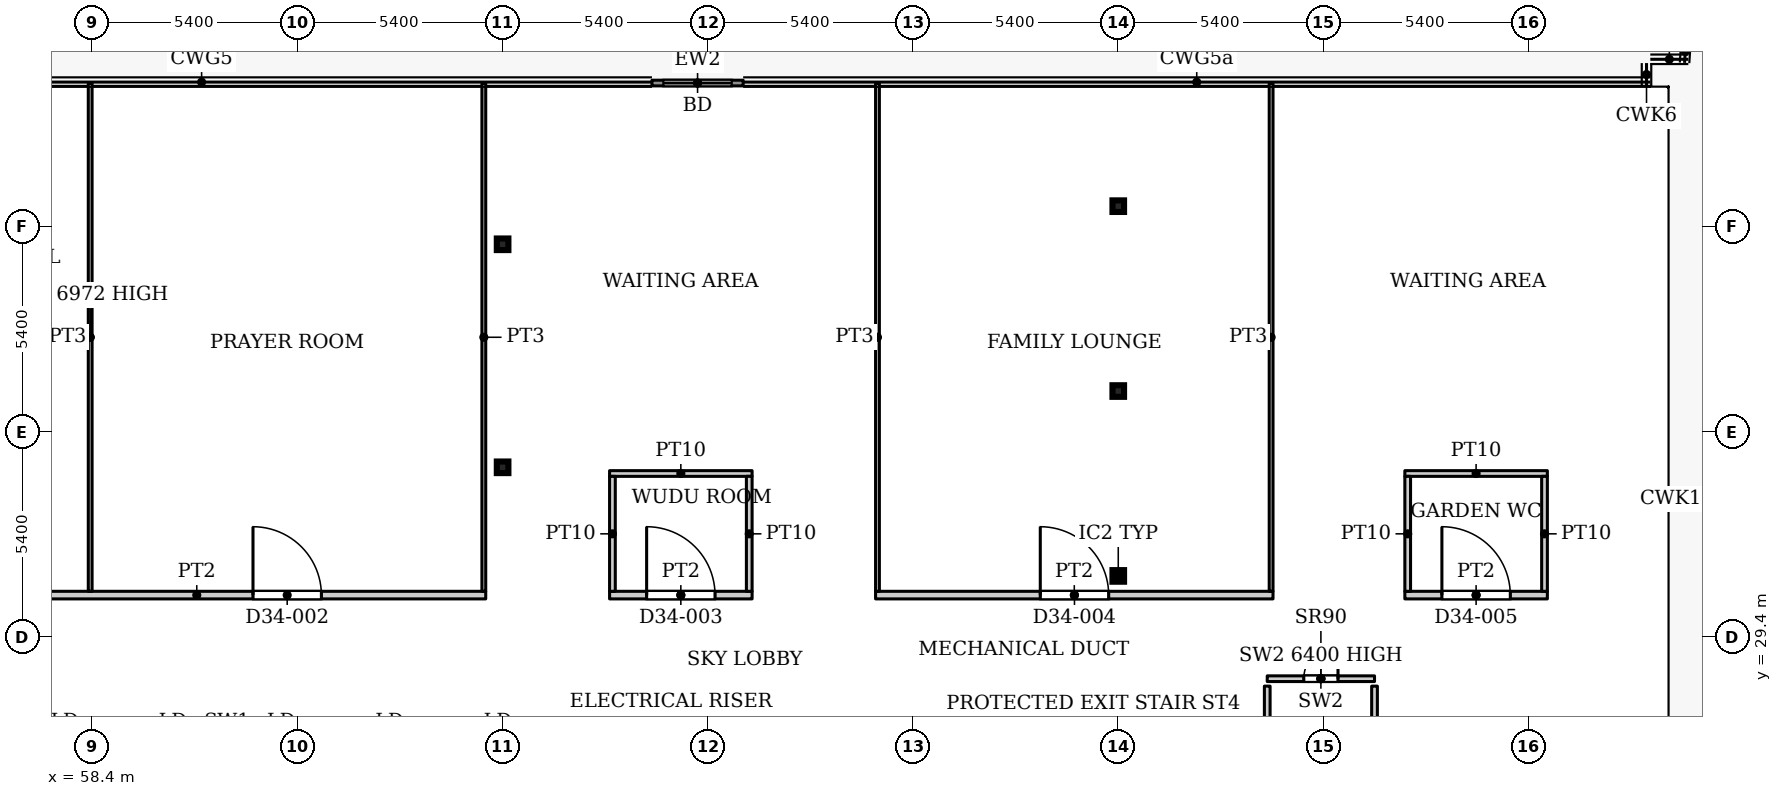
"""IFC4 building model, lengths in metres.
Left out: names, types, materials, properties, quantities, classifications, styles, units other than length and angle.
Written with IfcOpenShell. Run it as: python <this file> out.ifc"""

import sys

from ifc_helpers import new_model, si_unit, direction, frame, frame_2d, origin, origin_2d, place, context, subcontext, project, spatial, rectangle, hollow_rectangle, extrude, source, transform, mapped, element, fill, save


model = new_model("IFC4")
c1 = context("Model", 3, precision=1e-05, world=origin(), true_north=direction((0.0, 1.0)))
c2 = subcontext(c1, "Body", "Model", "MODEL_VIEW")
j1 = project(units=[si_unit("LENGTHUNIT", "METRE"), si_unit("PLANEANGLEUNIT", "RADIAN")], contexts=[c1])
p1 = place(None, origin())
s1 = spatial("IfcSite", under=j1, at=p1, CompositionType="ELEMENT")
p2 = place(p1, origin())
s2 = spatial("IfcBuilding", under=s1, at=p2, CompositionType="ELEMENT")
p3 = place(p2, frame((0.0, 0.0, 144.8)))
s3 = spatial("IfcBuildingStorey", under=s2, at=p3, CompositionType="ELEMENT", Elevation=144.8)
for number, where, z_axis, x_axis in (
    (1, (85.4, 31.005, 0.0), (0.0, 0.0, 1.0), (1.0, 0.0, 0.0)),
    (2, (69.2, 33.863, 0.0), (0.0, 0.0, 1.0), (1.0, 0.0, 0.0)),
    (3, (85.4, 35.87, 0.0), (0.0, 0.0, 1.0), (1.0, 0.0, 0.0)),
    (4, (69.2, 39.732, 0.0), (0.0, 0.0, 1.0), (1.0, 0.0, 0.0)),
    (5, (85.4, 40.735, 0.0), (0.0, 0.0, 1.0), (1.0, 0.0, 0.0)),
):
    element("IfcColumn", number, at=place(p3, frame(where, z_axis=z_axis, x_axis=x_axis)), inside=s3, PredefinedType="COLUMN", context=c2, shape_type="SweptSolid", body=[
        extrude(hollow_rectangle(XDim=0.305, YDim=0.305, WallThickness=0.016, InnerFilletRadius=0.016, OuterFilletRadius=0.032, at=origin_2d()), origin(), (0.0, 0.0, 1.0), 7.8),
    ])
p4 = place(p3, frame((73.13, 43.975, 0.0), z_axis=(0.0, 0.0, 1.0), x_axis=(1.0, 0.0, 0.0)))
e6 = element("IfcWall", 6, at=p4, inside=s3, PredefinedType="SOLIDWALL", context=c2, shape_type="SweptSolid", body=[
    extrude(rectangle(XDim=2.4, YDim=0.15, at=frame_2d((1.2, 0.0))), origin(), (0.0, 0.0, 1.0), 7.65),
])
p5 = place(p4, frame((0.3, 0.0, 0.0)))
e7 = element("IfcOpeningElement", 7, at=p5, cuts=e6, PredefinedType="OPENING", context=c2, shape_type="SweptSolid", body=[
    extrude(rectangle(XDim=1.8, YDim=2.4, at=frame_2d((0.9, 1.2))), frame((0.0, 0.085, 0.0), z_axis=(0.0, -1.0, 0.0), x_axis=(1.0, 0.0, 0.0)), (0.0, 0.0, 1.0), 0.17),
])
p6 = place(p3, frame((89.32, 28.3, 0.0), z_axis=(0.0, 0.0, 1.0), x_axis=(1.0, 0.0, 0.0)))
e8 = element("IfcWall", 8, at=p6, inside=s3, PredefinedType="PARTITIONING", context=c2, shape_type="SweptSolid", body=[
    extrude(rectangle(XDim=2.823, YDim=0.15, at=frame_2d((1.412, 0.0))), origin(), (0.0, 0.0, 1.0), 6.4),
])
p7 = place(p6, frame((0.962, 0.0, 0.0)))
e9 = element("IfcOpeningElement", 9, at=p7, cuts=e8, PredefinedType="OPENING", context=c2, shape_type="SweptSolid", body=[
    extrude(rectangle(XDim=0.9, YDim=2.2, at=frame_2d((0.45, 1.1))), frame((0.0, 0.085, 0.0), z_axis=(0.0, -1.0, 0.0), x_axis=(1.0, 0.0, 0.0)), (0.0, 0.0, 1.0), 0.17),
])
p8 = place(p3, frame((89.32, 25.62, 0.0), z_axis=(0.0, 0.0, 1.0), x_axis=(0.0, 1.0, 0.0)))
e10 = element("IfcWall", 10, at=p8, inside=s3, PredefinedType="PARTITIONING", context=c2, shape_type="SweptSolid", body=[
    extrude(rectangle(XDim=2.485, YDim=0.15, at=frame_2d((1.242, 0.0))), origin(), (0.0, 0.0, 1.0), 7.8),
])
p9 = place(p3, frame((92.143, 21.422, 0.0), z_axis=(0.0, 0.0, 1.0), x_axis=(0.0, 1.0, 0.0)))
e11 = element("IfcWall", 11, at=p9, inside=s3, PredefinedType="PARTITIONING", context=c2, shape_type="SweptSolid", body=[
    extrude(rectangle(XDim=6.683, YDim=0.15, at=frame_2d((3.341, 0.0))), origin(), (0.0, 0.0, 1.0), 7.8),
])
p10 = place(p3, frame((53.549, 30.5, 0.0), z_axis=(0.0, 0.0, 1.0), x_axis=(1.0, 0.0, 0.0)))
e12 = element("IfcWall", 12, at=p10, inside=s3, PredefinedType="PARTITIONING", context=c2, shape_type="SweptSolid", body=[
    extrude(rectangle(XDim=15.207, YDim=0.2, at=frame_2d((7.604, 0.0))), origin(), (0.0, 0.0, 1.0), 7.5),
])
p11 = place(p10, frame((9.083, 0.0, 0.0)))
e13 = element("IfcOpeningElement", 13, at=p11, cuts=e12, PredefinedType="OPENING", context=c2, shape_type="SweptSolid", body=[
    extrude(rectangle(XDim=1.8, YDim=2.1, at=frame_2d((0.9, 1.05))), frame((0.0, 0.11, 0.0), z_axis=(0.0, -1.0, 0.0), x_axis=(1.0, 0.0, 0.0)), (0.0, 0.0, 1.0), 0.22),
])
p12 = place(p3, frame((58.348, 30.6, 0.0), z_axis=(0.0, 0.0, 1.0), x_axis=(0.0, 1.0, 0.0)))
e14 = element("IfcWall", 14, at=p12, inside=s3, PredefinedType="PARTITIONING", context=c2, shape_type="SweptSolid", body=[
    extrude(rectangle(XDim=13.37, YDim=0.1, at=frame_2d((6.685, 0.0))), origin(), (0.0, 0.0, 1.0), 6.972),
])
p13 = place(p3, frame((68.706, 30.6, 0.0), z_axis=(0.0, 0.0, 1.0), x_axis=(0.0, 1.0, 0.0)))
e15 = element("IfcWall", 15, at=p13, inside=s3, PredefinedType="PARTITIONING", context=c2, shape_type="SweptSolid", body=[
    extrude(rectangle(XDim=13.37, YDim=0.1, at=frame_2d((6.685, 0.0))), origin(), (0.0, 0.0, 1.0), 7.5),
])
p14 = place(p3, frame((72.015, 30.5, 0.0), z_axis=(0.0, 0.0, 1.0), x_axis=(1.0, 0.0, 0.0)))
e16 = element("IfcWall", 16, at=p14, inside=s3, PredefinedType="PARTITIONING", context=c2, shape_type="SweptSolid", body=[
    extrude(rectangle(XDim=3.75, YDim=0.2, at=frame_2d((1.875, 0.0))), origin(), (0.0, 0.0, 1.0), 7.5),
])
p15 = place(p14, frame((0.975, 0.0, 0.0)))
e17 = element("IfcOpeningElement", 17, at=p15, cuts=e16, PredefinedType="OPENING", context=c2, shape_type="SweptSolid", body=[
    extrude(rectangle(XDim=1.8, YDim=2.1, at=frame_2d((0.9, 1.05))), frame((0.0, 0.11, 0.0), z_axis=(0.0, -1.0, 0.0), x_axis=(1.0, 0.0, 0.0)), (0.0, 0.0, 1.0), 0.22),
])
p16 = place(p3, frame((72.015, 33.7, 0.0), z_axis=(0.0, 0.0, 1.0), x_axis=(1.0, 0.0, 0.0)))
e18 = element("IfcWall", 18, at=p16, inside=s3, PredefinedType="PARTITIONING", context=c2, shape_type="SweptSolid", body=[
    extrude(rectangle(XDim=3.75, YDim=0.15, at=frame_2d((1.875, 0.0))), origin(), (0.0, 0.0, 1.0), 7.5),
])
for number, where, z_axis, x_axis in (
    (19, (72.09, 30.6, 0.0), (0.0, 0.0, 1.0), (0.0, 1.0, 0.0)),
    (20, (75.69, 30.6, 0.0), (0.0, 0.0, 1.0), (0.0, 1.0, 0.0)),
):
    element("IfcWall", number, at=place(p3, frame(where, z_axis=z_axis, x_axis=x_axis)), inside=s3, PredefinedType="PARTITIONING", context=c2, shape_type="SweptSolid", body=[
        extrude(rectangle(XDim=3.025, YDim=0.15, at=frame_2d((1.512, 0.0))), origin(), (0.0, 0.0, 1.0), 7.5),
    ])
p17 = place(p3, frame((79.014, 30.5, 0.0), z_axis=(0.0, 0.0, 1.0), x_axis=(1.0, 0.0, 0.0)))
e21 = element("IfcWall", 21, at=p17, inside=s3, PredefinedType="PARTITIONING", context=c2, shape_type="SweptSolid", body=[
    extrude(rectangle(XDim=10.458, YDim=0.2, at=frame_2d((5.229, 0.0))), origin(), (0.0, 0.0, 1.0), 7.5),
])
p18 = place(p17, frame((4.334, 0.0, 0.0)))
e22 = element("IfcOpeningElement", 22, at=p18, cuts=e21, PredefinedType="OPENING", context=c2, shape_type="SweptSolid", body=[
    extrude(rectangle(XDim=1.8, YDim=2.1, at=frame_2d((0.9, 1.05))), frame((0.0, 0.11, 0.0), z_axis=(0.0, -1.0, 0.0), x_axis=(1.0, 0.0, 0.0)), (0.0, 0.0, 1.0), 0.22),
])
for number, where, z_axis, x_axis in (
    (23, (79.064, 30.6, 0.0), (0.0, 0.0, 1.0), (0.0, 1.0, 0.0)),
    (24, (89.422, 30.6, 0.0), (0.0, 0.0, 1.0), (0.0, 1.0, 0.0)),
):
    element("IfcWall", number, at=place(p3, frame(where, z_axis=z_axis, x_axis=x_axis)), inside=s3, PredefinedType="PARTITIONING", context=c2, shape_type="SweptSolid", body=[
        extrude(rectangle(XDim=13.37, YDim=0.1, at=frame_2d((6.685, 0.0))), origin(), (0.0, 0.0, 1.0), 7.5),
    ])
p19 = place(p3, frame((92.941, 30.5, 0.0), z_axis=(0.0, 0.0, 1.0), x_axis=(1.0, 0.0, 0.0)))
e25 = element("IfcWall", 25, at=p19, inside=s3, PredefinedType="PARTITIONING", context=c2, shape_type="SweptSolid", body=[
    extrude(rectangle(XDim=3.75, YDim=0.2, at=frame_2d((1.875, 0.0))), origin(), (0.0, 0.0, 1.0), 7.5),
])
p20 = place(p19, frame((0.975, 0.0, 0.0)))
e26 = element("IfcOpeningElement", 26, at=p20, cuts=e25, PredefinedType="OPENING", context=c2, shape_type="SweptSolid", body=[
    extrude(rectangle(XDim=1.8, YDim=2.1, at=frame_2d((0.9, 1.05))), frame((0.0, 0.11, 0.0), z_axis=(0.0, -1.0, 0.0), x_axis=(1.0, 0.0, 0.0)), (0.0, 0.0, 1.0), 0.22),
])
p21 = place(p3, frame((92.941, 33.7, 0.0), z_axis=(0.0, 0.0, 1.0), x_axis=(1.0, 0.0, 0.0)))
e27 = element("IfcWall", 27, at=p21, inside=s3, PredefinedType="PARTITIONING", context=c2, shape_type="SweptSolid", body=[
    extrude(rectangle(XDim=3.75, YDim=0.15, at=frame_2d((1.875, 0.0))), origin(), (0.0, 0.0, 1.0), 7.5),
])
for number, where, z_axis, x_axis in (
    (28, (93.016, 30.6, 0.0), (0.0, 0.0, 1.0), (0.0, 1.0, 0.0)),
    (29, (96.616, 30.6, 0.0), (0.0, 0.0, 1.0), (0.0, 1.0, 0.0)),
):
    element("IfcWall", number, at=place(p3, frame(where, z_axis=z_axis, x_axis=x_axis)), inside=s3, PredefinedType="PARTITIONING", context=c2, shape_type="SweptSolid", body=[
        extrude(rectangle(XDim=3.025, YDim=0.15, at=frame_2d((1.512, 0.0))), origin(), (0.0, 0.0, 1.0), 7.5),
    ])
m1 = source(origin(), c2, "Body", "SweptSolid", [
    extrude(rectangle(XDim=1.8, YDim=2.4, at=frame_2d((0.9, 1.2))), frame((0.0, 0.025, 0.0), z_axis=(0.0, -1.0, 0.0), x_axis=(1.0, 0.0, 0.0)), (0.0, 0.0, 1.0), 0.05),
])
p22 = place(p5, origin())
e30 = element("IfcDoor", 30, at=p22, inside=s3, OperationType="SLIDING_TO_LEFT", PredefinedType="DOOR", context=c2, shape_type="MappedRepresentation", body=[
    mapped(m1, transform((0.0, 0.0, 0.0), x_axis=(1.0, 0.0, 0.0), y_axis=(0.0, 1.0, 0.0), z_axis=(0.0, 0.0, 1.0), scale=1.0)),
])
fill(e7, e30)
m2 = source(origin(), c2, "Body", "SweptSolid", [
    extrude(rectangle(XDim=0.9, YDim=2.2, at=frame_2d((0.45, 1.1))), frame((0.0, 0.025, 0.0), z_axis=(0.0, -1.0, 0.0), x_axis=(1.0, 0.0, 0.0)), (0.0, 0.0, 1.0), 0.05),
])
p23 = place(p7, origin())
e31 = element("IfcDoor", 31, at=p23, inside=s3, OperationType="SINGLE_SWING_LEFT", PredefinedType="DOOR", context=c2, shape_type="MappedRepresentation", body=[
    mapped(m2, transform((0.0, 0.0, 0.0), x_axis=(1.0, 0.0, 0.0), y_axis=(0.0, 1.0, 0.0), z_axis=(0.0, 0.0, 1.0), scale=1.0)),
])
fill(e9, e31)
m3 = source(origin(), c2, "Body", "SweptSolid", [
    extrude(rectangle(XDim=1.8, YDim=2.1, at=frame_2d((0.9, 1.05))), frame((0.0, 0.025, 0.0), z_axis=(0.0, -1.0, 0.0), x_axis=(1.0, 0.0, 0.0)), (0.0, 0.0, 1.0), 0.05),
])
p24 = place(p11, origin())
e32 = element("IfcDoor", 32, at=p24, inside=s3, OperationType="DOUBLE_DOOR_SINGLE_SWING", PredefinedType="DOOR", context=c2, shape_type="MappedRepresentation", body=[
    mapped(m3, transform((0.0, 0.0, 0.0), x_axis=(1.0, 0.0, 0.0), y_axis=(0.0, 1.0, 0.0), z_axis=(0.0, 0.0, 1.0), scale=1.0)),
])
fill(e13, e32)
p25 = place(p15, origin())
e33 = element("IfcDoor", 33, at=p25, inside=s3, OperationType="DOUBLE_DOOR_SINGLE_SWING", PredefinedType="DOOR", context=c2, shape_type="MappedRepresentation", body=[
    mapped(m3, transform((0.0, 0.0, 0.0), x_axis=(1.0, 0.0, 0.0), y_axis=(0.0, 1.0, 0.0), z_axis=(0.0, 0.0, 1.0), scale=1.0)),
])
fill(e17, e33)
p26 = place(p18, origin())
e34 = element("IfcDoor", 34, at=p26, inside=s3, OperationType="DOUBLE_DOOR_SINGLE_SWING", PredefinedType="DOOR", context=c2, shape_type="MappedRepresentation", body=[
    mapped(m3, transform((0.0, 0.0, 0.0), x_axis=(1.0, 0.0, 0.0), y_axis=(0.0, 1.0, 0.0), z_axis=(0.0, 0.0, 1.0), scale=1.0)),
])
fill(e22, e34)
p27 = place(p20, origin())
e35 = element("IfcDoor", 35, at=p27, inside=s3, OperationType="DOUBLE_DOOR_SINGLE_SWING", PredefinedType="DOOR", context=c2, shape_type="MappedRepresentation", body=[
    mapped(m3, transform((0.0, 0.0, 0.0), x_axis=(1.0, 0.0, 0.0), y_axis=(0.0, 1.0, 0.0), z_axis=(0.0, 0.0, 1.0), scale=1.0)),
])
fill(e26, e35)
save(model, sys.argv[1])
